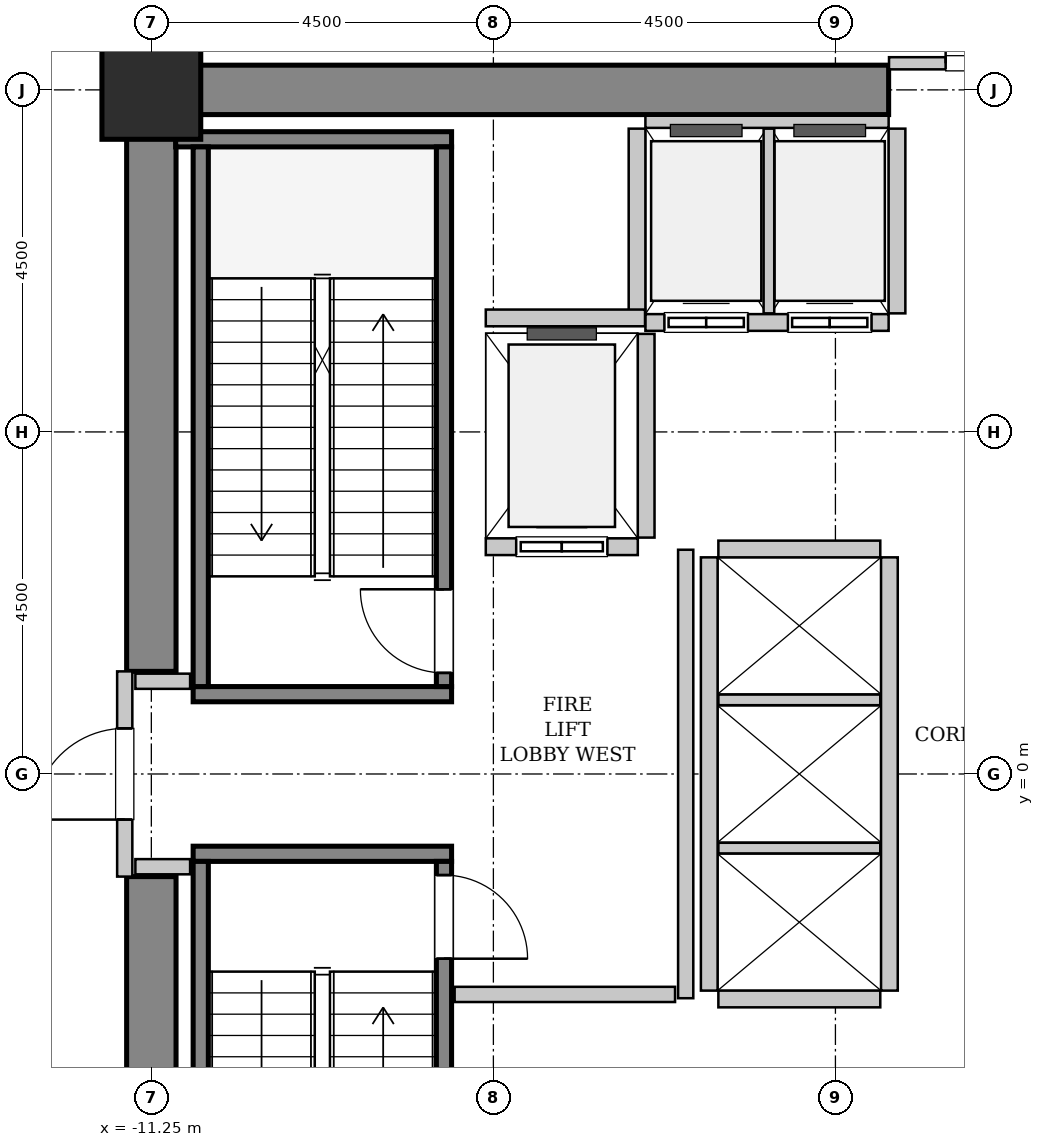
"""IFC4 building model, lengths in metres.
Left out: names, types, materials, properties, quantities, classifications, styles, units other than length and angle.
Written with IfcOpenShell. Run it as: python <this file> out.ifc"""

import sys

from ifc_helpers import new_model, si_unit, direction, frame, frame_2d, origin, origin_2d, place, context, subcontext, project, spatial, rectangle, hollow_rectangle, extrude, source, transform, mapped, element, fill, save


model = new_model("IFC4")
c1 = context("Model", 3, precision=1e-05, world=origin(), true_north=direction((0.0, 1.0)))
c2 = subcontext(c1, "Body", "Model", "MODEL_VIEW")
j1 = project(units=[si_unit("LENGTHUNIT", "METRE"), si_unit("PLANEANGLEUNIT", "RADIAN")], contexts=[c1])
p1 = place(None, origin())
s1 = spatial("IfcSite", under=j1, at=p1, CompositionType="ELEMENT")
p2 = place(p1, origin())
s2 = spatial("IfcBuilding", under=s1, at=p2, CompositionType="ELEMENT")
p3 = place(p2, frame((0.0, 0.0, 11.4)))
s3 = spatial("IfcBuildingStorey", under=s2, at=p3, CompositionType="ELEMENT", Elevation=11.4)
m1 = source(origin(), c2, "Body", "SweptSolid", [
    extrude(rectangle(XDim=10.025, YDim=0.65, at=frame_2d((5.012, 0.0))), origin(), (0.0, 0.0, 1.0), 5.4),
])
p4 = place(p3, frame((-11.575, 9.0, 0.0), z_axis=(0.0, 0.0, 1.0), x_axis=(1.0, 0.0, 0.0)))
e1 = element("IfcWall", 1, at=p4, inside=s3, PredefinedType="SHEAR", context=c2, shape_type="MappedRepresentation", body=[
    mapped(m1, transform((0.0, 0.0, 0.0), x_axis=(1.0, 0.0, 0.0), y_axis=(0.0, 1.0, 0.0), z_axis=(0.0, 0.0, 1.0), scale=1.0)),
])
m2 = source(origin(), c2, "Body", "SweptSolid", [
    extrude(rectangle(XDim=7.325, YDim=0.65, at=frame_2d((3.663, 0.0))), origin(), (0.0, 0.0, 1.0), 5.4),
])
for number, where, z_axis, x_axis in (
    (2, (-11.25, -8.675, 0.0), (0.0, 0.0, 1.0), (0.0, 1.0, 0.0)),
    (3, (-11.25, 1.35, 0.0), (0.0, 0.0, 1.0), (0.0, 1.0, 0.0)),
):
    element("IfcWall", number, at=place(p3, frame(where, z_axis=z_axis, x_axis=x_axis)), inside=s3, PredefinedType="SHEAR", context=c2, shape_type="MappedRepresentation", body=[
        mapped(m2, transform((0.0, 0.0, 0.0), x_axis=(1.0, 0.0, 0.0), y_axis=(0.0, 1.0, 0.0), z_axis=(0.0, 0.0, 1.0), scale=1.0)),
    ])
m3 = source(origin(), c2, "Body", "SweptSolid", [
    extrude(hollow_rectangle(XDim=1.3, YDim=1.3, WallThickness=0.065, InnerFilletRadius=0.065, OuterFilletRadius=0.13, at=origin_2d()), origin(), (0.0, 0.0, 1.0), 5.4),
])
p5 = place(p3, frame((-11.25, 9.0, 0.0), z_axis=(0.0, 0.0, 1.0), x_axis=(1.0, 0.0, 0.0)))
e4 = element("IfcColumn", 4, at=p5, inside=s3, PredefinedType="COLUMN", context=c2, shape_type="MappedRepresentation", body=[
    mapped(m3, transform((0.0, 0.0, 0.0), x_axis=(1.0, 0.0, 0.0), y_axis=(0.0, 1.0, 0.0), z_axis=(0.0, 0.0, 1.0), scale=1.0)),
])
m4 = source(origin(), c2, "Body", "SweptSolid", [
    extrude(rectangle(XDim=3.4, YDim=0.2, at=frame_2d((1.7, 0.0))), origin(), (0.0, 0.0, 1.0), 5.4),
])
p6 = place(p3, frame((-7.3, 1.05, 0.0), z_axis=(0.0, 0.0, 1.0), x_axis=(-1.0, 0.0, 0.0)))
e5 = element("IfcWall", 5, at=p6, inside=s3, PredefinedType="SOLIDWALL", context=c2, shape_type="MappedRepresentation", body=[
    mapped(m4, transform((0.0, 0.0, 0.0), x_axis=(1.0, 0.0, 0.0), y_axis=(0.0, 1.0, 0.0), z_axis=(0.0, 0.0, 1.0), scale=1.0)),
])
m5 = source(origin(), c2, "Body", "SweptSolid", [
    extrude(rectangle(XDim=3.63, YDim=0.2, at=frame_2d((1.815, 0.0))), origin(), (0.0, 0.0, 1.0), 5.4),
])
p7 = place(p3, frame((-7.3, 8.35, 0.0), z_axis=(0.0, 0.0, 1.0), x_axis=(-1.0, 0.0, 0.0)))
e6 = element("IfcWall", 6, at=p7, inside=s3, PredefinedType="SOLIDWALL", context=c2, shape_type="MappedRepresentation", body=[
    mapped(m5, transform((0.0, 0.0, 0.0), x_axis=(1.0, 0.0, 0.0), y_axis=(0.0, 1.0, 0.0), z_axis=(0.0, 0.0, 1.0), scale=1.0)),
])
m6 = source(origin(), c2, "Body", "SweptSolid", [
    extrude(rectangle(XDim=7.1, YDim=0.2, at=frame_2d((3.55, 0.0))), origin(), (0.0, 0.0, 1.0), 5.4),
])
p8 = place(p3, frame((-7.4, 1.15, 0.0), z_axis=(0.0, 0.0, 1.0), x_axis=(0.0, 1.0, 0.0)))
e7 = element("IfcWall", 7, at=p8, inside=s3, PredefinedType="SOLIDWALL", context=c2, shape_type="MappedRepresentation", body=[
    mapped(m6, transform((0.0, 0.0, 0.0), x_axis=(1.0, 0.0, 0.0), y_axis=(0.0, 1.0, 0.0), z_axis=(0.0, 0.0, 1.0), scale=1.0)),
])
p9 = place(p8, frame((0.18, 0.0, 0.0)))
e8 = element("IfcOpeningElement", 8, at=p9, cuts=e7, PredefinedType="OPENING", context=c2, shape_type="SweptSolid", body=[
    extrude(rectangle(XDim=1.1, YDim=2.15, at=frame_2d((0.55, 1.075))), frame((0.0, 0.11, 0.0), z_axis=(0.0, -1.0, 0.0), x_axis=(1.0, 0.0, 0.0)), (0.0, 0.0, 1.0), 0.22),
])
p10 = place(p3, frame((-10.6, 1.15, 0.0), z_axis=(0.0, 0.0, 1.0), x_axis=(0.0, 1.0, 0.0)))
e9 = element("IfcWall", 9, at=p10, inside=s3, PredefinedType="SOLIDWALL", context=c2, shape_type="MappedRepresentation", body=[
    mapped(m6, transform((0.0, 0.0, 0.0), x_axis=(1.0, 0.0, 0.0), y_axis=(0.0, 1.0, 0.0), z_axis=(0.0, 0.0, 1.0), scale=1.0)),
])
p11 = place(p3, frame((-10.7, -1.05, 0.0), z_axis=(0.0, 0.0, 1.0), x_axis=(1.0, 0.0, 0.0)))
e10 = element("IfcWall", 10, at=p11, inside=s3, PredefinedType="SOLIDWALL", context=c2, shape_type="MappedRepresentation", body=[
    mapped(m4, transform((0.0, 0.0, 0.0), x_axis=(1.0, 0.0, 0.0), y_axis=(0.0, 1.0, 0.0), z_axis=(0.0, 0.0, 1.0), scale=1.0)),
])
p12 = place(p3, frame((-10.6, -1.15, 0.0), z_axis=(0.0, 0.0, 1.0), x_axis=(0.0, -1.0, 0.0)))
e11 = element("IfcWall", 11, at=p12, inside=s3, PredefinedType="SOLIDWALL", context=c2, shape_type="MappedRepresentation", body=[
    mapped(m6, transform((0.0, 0.0, 0.0), x_axis=(1.0, 0.0, 0.0), y_axis=(0.0, 1.0, 0.0), z_axis=(0.0, 0.0, 1.0), scale=1.0)),
])
p13 = place(p3, frame((-7.4, -1.15, 0.0), z_axis=(0.0, 0.0, 1.0), x_axis=(0.0, -1.0, 0.0)))
e12 = element("IfcWall", 12, at=p13, inside=s3, PredefinedType="SOLIDWALL", context=c2, shape_type="MappedRepresentation", body=[
    mapped(m6, transform((0.0, 0.0, 0.0), x_axis=(1.0, 0.0, 0.0), y_axis=(0.0, 1.0, 0.0), z_axis=(0.0, 0.0, 1.0), scale=1.0)),
])
p14 = place(p13, frame((0.18, 0.0, 0.0)))
e13 = element("IfcOpeningElement", 13, at=p14, cuts=e12, PredefinedType="OPENING", context=c2, shape_type="SweptSolid", body=[
    extrude(rectangle(XDim=1.1, YDim=2.15, at=frame_2d((0.55, 1.075))), frame((0.0, 0.11, 0.0), z_axis=(0.0, -1.0, 0.0), x_axis=(1.0, 0.0, 0.0)), (0.0, 0.0, 1.0), 0.22),
])
m7 = source(origin(), c2, "Body", "SweptSolid", [
    extrude(rectangle(XDim=2.0, YDim=0.22, at=frame_2d((1.0, 0.0))), origin(), (0.0, 0.0, 1.0), 5.085),
])
p15 = place(p3, frame((-6.85, 2.99, 0.0), z_axis=(0.0, 0.0, 1.0), x_axis=(1.0, 0.0, 0.0)))
e14 = element("IfcWall", 14, at=p15, inside=s3, PredefinedType="SOLIDWALL", context=c2, shape_type="MappedRepresentation", body=[
    mapped(m7, transform((0.0, 0.0, 0.0), x_axis=(1.0, 0.0, 0.0), y_axis=(0.0, 1.0, 0.0), z_axis=(0.0, 0.0, 1.0), scale=1.0)),
])
p16 = place(p15, frame((0.4, 0.0, 0.0)))
e15 = element("IfcOpeningElement", 15, at=p16, cuts=e14, PredefinedType="OPENING", context=c2, shape_type="SweptSolid", body=[
    extrude(rectangle(XDim=1.2, YDim=2.2, at=frame_2d((0.6, 1.1))), frame((0.0, 0.12, 0.0), z_axis=(0.0, -1.0, 0.0), x_axis=(1.0, 0.0, 0.0)), (0.0, 0.0, 1.0), 0.24),
])
m8 = source(origin(), c2, "Body", "SweptSolid", [
    extrude(rectangle(XDim=2.68, YDim=0.22, at=frame_2d((1.34, 0.0))), origin(), (0.0, 0.0, 1.0), 5.085),
])
p17 = place(p3, frame((-4.74, 3.11, 0.0), z_axis=(0.0, 0.0, 1.0), x_axis=(0.0, 1.0, 0.0)))
e16 = element("IfcWall", 16, at=p17, inside=s3, PredefinedType="SOLIDWALL", context=c2, shape_type="MappedRepresentation", body=[
    mapped(m8, transform((0.0, 0.0, 0.0), x_axis=(1.0, 0.0, 0.0), y_axis=(0.0, 1.0, 0.0), z_axis=(0.0, 0.0, 1.0), scale=1.0)),
])
m9 = source(origin(), c2, "Body", "SweptSolid", [
    extrude(rectangle(XDim=3.2, YDim=0.22, at=frame_2d((1.6, 0.0))), origin(), (0.0, 0.0, 1.0), 5.085),
])
p18 = place(p3, frame((-4.75, 5.94, 0.0), z_axis=(0.0, 0.0, 1.0), x_axis=(1.0, 0.0, 0.0)))
e17 = element("IfcWall", 17, at=p18, inside=s3, PredefinedType="SOLIDWALL", context=c2, shape_type="MappedRepresentation", body=[
    mapped(m9, transform((0.0, 0.0, 0.0), x_axis=(1.0, 0.0, 0.0), y_axis=(0.0, 1.0, 0.0), z_axis=(0.0, 0.0, 1.0), scale=1.0)),
])
p19 = place(p18, frame((0.25, 0.0, 0.0)))
e18 = element("IfcOpeningElement", 18, at=p19, cuts=e17, PredefinedType="OPENING", context=c2, shape_type="SweptSolid", body=[
    extrude(rectangle(XDim=1.1, YDim=2.2, at=frame_2d((0.55, 1.1))), frame((0.0, 0.12, 0.0), z_axis=(0.0, -1.0, 0.0), x_axis=(1.0, 0.0, 0.0)), (0.0, 0.0, 1.0), 0.24),
])
p20 = place(p18, frame((1.875, 0.0, 0.0)))
e19 = element("IfcOpeningElement", 19, at=p20, cuts=e17, PredefinedType="OPENING", context=c2, shape_type="SweptSolid", body=[
    extrude(rectangle(XDim=1.1, YDim=2.2, at=frame_2d((0.55, 1.1))), frame((0.0, 0.12, 0.0), z_axis=(0.0, -1.0, 0.0), x_axis=(1.0, 0.0, 0.0)), (0.0, 0.0, 1.0), 0.24),
])
m10 = source(origin(), c2, "Body", "SweptSolid", [
    extrude(rectangle(XDim=3.2, YDim=0.16, at=frame_2d((1.6, 0.0))), origin(), (0.0, 0.0, 1.0), 3.975),
])
p21 = place(p3, frame((-1.55, 8.58, 0.0), z_axis=(0.0, 0.0, 1.0), x_axis=(-1.0, 0.0, 0.0)))
e20 = element("IfcWall", 20, at=p21, inside=s3, PredefinedType="PARTITIONING", context=c2, shape_type="MappedRepresentation", body=[
    mapped(m10, transform((0.0, 0.0, 0.0), x_axis=(1.0, 0.0, 0.0), y_axis=(0.0, 1.0, 0.0), z_axis=(0.0, 0.0, 1.0), scale=1.0)),
])
m11 = source(origin(), c2, "Body", "SweptSolid", [
    extrude(rectangle(XDim=2.43, YDim=0.22, at=frame_2d((1.215, 0.0))), origin(), (0.0, 0.0, 1.0), 5.085),
])
p22 = place(p3, frame((-4.86, 8.49, 0.0), z_axis=(0.0, 0.0, 1.0), x_axis=(0.0, -1.0, 0.0)))
e21 = element("IfcWall", 21, at=p22, inside=s3, PredefinedType="SOLIDWALL", context=c2, shape_type="MappedRepresentation", body=[
    mapped(m11, transform((0.0, 0.0, 0.0), x_axis=(1.0, 0.0, 0.0), y_axis=(0.0, 1.0, 0.0), z_axis=(0.0, 0.0, 1.0), scale=1.0)),
])
m12 = source(origin(), c2, "Body", "SweptSolid", [
    extrude(rectangle(XDim=2.43, YDim=0.14, at=frame_2d((1.215, 0.0))), origin(), (0.0, 0.0, 1.0), 5.085),
])
p23 = place(p3, frame((-3.125, 6.06, 0.0), z_axis=(0.0, 0.0, 1.0), x_axis=(0.0, 1.0, 0.0)))
e22 = element("IfcWall", 22, at=p23, inside=s3, PredefinedType="PARTITIONING", context=c2, shape_type="MappedRepresentation", body=[
    mapped(m12, transform((0.0, 0.0, 0.0), x_axis=(1.0, 0.0, 0.0), y_axis=(0.0, 1.0, 0.0), z_axis=(0.0, 0.0, 1.0), scale=1.0)),
])
p24 = place(p3, frame((-1.44, 6.06, 0.0), z_axis=(0.0, 0.0, 1.0), x_axis=(0.0, 1.0, 0.0)))
e23 = element("IfcWall", 23, at=p24, inside=s3, PredefinedType="SOLIDWALL", context=c2, shape_type="MappedRepresentation", body=[
    mapped(m11, transform((0.0, 0.0, 0.0), x_axis=(1.0, 0.0, 0.0), y_axis=(0.0, 1.0, 0.0), z_axis=(0.0, 0.0, 1.0), scale=1.0)),
])
m13 = source(origin(), c2, "Body", "SweptSolid", [
    extrude(rectangle(XDim=5.7, YDim=0.22, at=frame_2d((2.85, 0.0))), origin(), (0.0, 0.0, 1.0), 5.085),
])
for number, where, z_axis, x_axis in (
    (24, (-1.54, -2.85, 0.0), (0.0, 0.0, 1.0), (0.0, 1.0, 0.0)),
    (25, (-3.91, 2.85, 0.0), (0.0, 0.0, 1.0), (0.0, -1.0, 0.0)),
):
    element("IfcWall", number, at=place(p3, frame(where, z_axis=z_axis, x_axis=x_axis)), inside=s3, PredefinedType="SOLIDWALL", context=c2, shape_type="MappedRepresentation", body=[
        mapped(m13, transform((0.0, 0.0, 0.0), x_axis=(1.0, 0.0, 0.0), y_axis=(0.0, 1.0, 0.0), z_axis=(0.0, 0.0, 1.0), scale=1.0)),
    ])
m14 = source(origin(), c2, "Body", "SweptSolid", [
    extrude(rectangle(XDim=2.13, YDim=0.22, at=frame_2d((1.065, 0.0))), origin(), (0.0, 0.0, 1.0), 5.085),
])
p25 = place(p3, frame((-3.79, -2.96, 0.0), z_axis=(0.0, 0.0, 1.0), x_axis=(1.0, 0.0, 0.0)))
e26 = element("IfcWall", 26, at=p25, inside=s3, PredefinedType="SOLIDWALL", context=c2, shape_type="MappedRepresentation", body=[
    mapped(m14, transform((0.0, 0.0, 0.0), x_axis=(1.0, 0.0, 0.0), y_axis=(0.0, 1.0, 0.0), z_axis=(0.0, 0.0, 1.0), scale=1.0)),
])
m15 = source(origin(), c2, "Body", "SweptSolid", [
    extrude(rectangle(XDim=2.13, YDim=0.14, at=frame_2d((1.065, 0.0))), origin(), (0.0, 0.0, 1.0), 5.085),
])
for number, where, z_axis, x_axis in (
    (27, (-3.79, -0.975, 0.0), (0.0, 0.0, 1.0), (1.0, 0.0, 0.0)),
    (28, (-3.79, 0.975, 0.0), (0.0, 0.0, 1.0), (1.0, 0.0, 0.0)),
):
    element("IfcWall", number, at=place(p3, frame(where, z_axis=z_axis, x_axis=x_axis)), inside=s3, PredefinedType="PARTITIONING", context=c2, shape_type="MappedRepresentation", body=[
        mapped(m15, transform((0.0, 0.0, 0.0), x_axis=(1.0, 0.0, 0.0), y_axis=(0.0, 1.0, 0.0), z_axis=(0.0, 0.0, 1.0), scale=1.0)),
    ])
p26 = place(p3, frame((-1.66, 2.96, 0.0), z_axis=(0.0, 0.0, 1.0), x_axis=(-1.0, 0.0, 0.0)))
e29 = element("IfcWall", 29, at=p26, inside=s3, PredefinedType="SOLIDWALL", context=c2, shape_type="MappedRepresentation", body=[
    mapped(m14, transform((0.0, 0.0, 0.0), x_axis=(1.0, 0.0, 0.0), y_axis=(0.0, 1.0, 0.0), z_axis=(0.0, 0.0, 1.0), scale=1.0)),
])
m16 = source(origin(), c2, "Body", "SweptSolid", [
    extrude(rectangle(XDim=2.095, YDim=0.22, at=frame_2d((1.048, 0.0))), origin(), (0.0, 0.0, 1.0), 5.085),
])
p27 = place(p3, frame((-6.85, 6.0, 0.0), z_axis=(0.0, 0.0, 1.0), x_axis=(1.0, 0.0, 0.0)))
e30 = element("IfcWall", 30, at=p27, inside=s3, PredefinedType="SOLIDWALL", context=c2, shape_type="MappedRepresentation", body=[
    mapped(m16, transform((0.0, 0.0, 0.0), x_axis=(1.0, 0.0, 0.0), y_axis=(0.0, 1.0, 0.0), z_axis=(0.0, 0.0, 1.0), scale=1.0)),
])
m17 = source(origin(), c2, "Body", "SweptSolid", [
    extrude(rectangle(XDim=2.7, YDim=0.2, at=frame_2d((1.35, 0.0))), origin(), (0.0, 0.0, 1.0), 3.975),
])
p28 = place(p3, frame((-11.6, -1.35, 0.0), z_axis=(0.0, 0.0, 1.0), x_axis=(0.0, 1.0, 0.0)))
e31 = element("IfcWall", 31, at=p28, inside=s3, PredefinedType="PARTITIONING", context=c2, shape_type="MappedRepresentation", body=[
    mapped(m17, transform((0.0, 0.0, 0.0), x_axis=(1.0, 0.0, 0.0), y_axis=(0.0, 1.0, 0.0), z_axis=(0.0, 0.0, 1.0), scale=1.0)),
])
p29 = place(p28, frame((0.75, 0.0, 0.0)))
e32 = element("IfcOpeningElement", 32, at=p29, cuts=e31, PredefinedType="OPENING", context=c2, shape_type="SweptSolid", body=[
    extrude(rectangle(XDim=1.2, YDim=2.15, at=frame_2d((0.6, 1.075))), frame((0.0, 0.11, 0.0), z_axis=(0.0, -1.0, 0.0), x_axis=(1.0, 0.0, 0.0)), (0.0, 0.0, 1.0), 0.22),
])
m18 = source(origin(), c2, "Body", "SweptSolid", [
    extrude(rectangle(XDim=5.9, YDim=0.2, at=frame_2d((2.95, 0.0))), origin(), (0.0, 0.0, 1.0), 5.085),
])
p30 = place(p3, frame((-4.22, -2.95, 0.0), z_axis=(0.0, 0.0, 1.0), x_axis=(0.0, 1.0, 0.0)))
e33 = element("IfcWall", 33, at=p30, inside=s3, PredefinedType="PARTITIONING", context=c2, shape_type="MappedRepresentation", body=[
    mapped(m18, transform((0.0, 0.0, 0.0), x_axis=(1.0, 0.0, 0.0), y_axis=(0.0, 1.0, 0.0), z_axis=(0.0, 0.0, 1.0), scale=1.0)),
])
m19 = source(origin(), c2, "Body", "SweptSolid", [
    extrude(rectangle(XDim=2.9, YDim=0.2, at=frame_2d((1.45, 0.0))), origin(), (0.0, 0.0, 1.0), 5.085),
])
p31 = place(p3, frame((-7.26, -2.9, 0.0), z_axis=(0.0, 0.0, 1.0), x_axis=(1.0, 0.0, 0.0)))
e34 = element("IfcWall", 34, at=p31, inside=s3, PredefinedType="PARTITIONING", context=c2, shape_type="MappedRepresentation", body=[
    mapped(m19, transform((0.0, 0.0, 0.0), x_axis=(1.0, 0.0, 0.0), y_axis=(0.0, 1.0, 0.0), z_axis=(0.0, 0.0, 1.0), scale=1.0)),
])
m20 = source(origin(), c2, "Body", "SweptSolid", [
    extrude(rectangle(XDim=0.72, YDim=0.2, at=frame_2d((0.36, 0.0))), origin(), (0.0, 0.0, 1.0), 5.085),
])
for number, where, z_axis, x_axis in (
    (35, (-11.46, 1.22, 0.0), (0.0, 0.0, 1.0), (1.0, 0.0, 0.0)),
    (36, (-11.46, -1.22, 0.0), (0.0, 0.0, 1.0), (1.0, 0.0, 0.0)),
):
    element("IfcWall", number, at=place(p3, frame(where, z_axis=z_axis, x_axis=x_axis)), inside=s3, PredefinedType="PARTITIONING", context=c2, shape_type="MappedRepresentation", body=[
        mapped(m20, transform((0.0, 0.0, 0.0), x_axis=(1.0, 0.0, 0.0), y_axis=(0.0, 1.0, 0.0), z_axis=(0.0, 0.0, 1.0), scale=1.0)),
    ])
m21 = source(origin(), c2, "Body", "SweptSolid", [
    extrude(rectangle(XDim=3.09, YDim=0.16, at=frame_2d((1.545, 0.0))), origin(), (0.0, 0.0, 1.0), 3.975),
])
p32 = place(p3, frame((-1.545, 9.35, 0.0), z_axis=(0.0, 0.0, 1.0), x_axis=(1.0, 0.0, 0.0)))
e37 = element("IfcWall", 37, at=p32, inside=s3, PredefinedType="PARTITIONING", context=c2, shape_type="MappedRepresentation", body=[
    mapped(m21, transform((0.0, 0.0, 0.0), x_axis=(1.0, 0.0, 0.0), y_axis=(0.0, 1.0, 0.0), z_axis=(0.0, 0.0, 1.0), scale=1.0)),
])
p33 = place(p32, frame((0.745, 0.0, 0.0)))
e38 = element("IfcOpeningElement", 38, at=p33, cuts=e37, PredefinedType="OPENING", context=c2, shape_type="SweptSolid", body=[
    extrude(rectangle(XDim=1.6, YDim=2.3, at=frame_2d((0.8, 1.15))), frame((0.0, 0.09, 0.0), z_axis=(0.0, -1.0, 0.0), x_axis=(1.0, 0.0, 0.0)), (0.0, 0.0, 1.0), 0.18),
])
m22 = source(origin(), c2, "Body", "SweptSolid", [
    extrude(rectangle(XDim=1.1, YDim=2.15, at=frame_2d((0.55, 1.075))), frame((0.0, 0.025, 0.0), z_axis=(0.0, -1.0, 0.0), x_axis=(1.0, 0.0, 0.0)), (0.0, 0.0, 1.0), 0.05),
])
p34 = place(p9, origin())
e39 = element("IfcDoor", 39, at=p34, inside=s3, OperationType="SINGLE_SWING_RIGHT", PredefinedType="DOOR", context=c2, shape_type="MappedRepresentation", body=[
    mapped(m22, transform((0.0, 0.0, 0.0), x_axis=(1.0, 0.0, 0.0), y_axis=(0.0, 1.0, 0.0), z_axis=(0.0, 0.0, 1.0), scale=1.0)),
])
fill(e8, e39)
p35 = place(p14, origin())
e40 = element("IfcDoor", 40, at=p35, inside=s3, OperationType="SINGLE_SWING_RIGHT", PredefinedType="DOOR", context=c2, shape_type="MappedRepresentation", body=[
    mapped(m22, transform((0.0, 0.0, 0.0), x_axis=(1.0, 0.0, 0.0), y_axis=(0.0, 1.0, 0.0), z_axis=(0.0, 0.0, 1.0), scale=1.0)),
])
fill(e13, e40)
m23 = source(origin(), c2, "Body", "SweptSolid", [
    extrude(rectangle(XDim=1.2, YDim=2.2, at=frame_2d((0.6, 1.1))), frame((0.0, 0.025, 0.0), z_axis=(0.0, -1.0, 0.0), x_axis=(1.0, 0.0, 0.0)), (0.0, 0.0, 1.0), 0.05),
])
p36 = place(p16, origin())
e41 = element("IfcDoor", 41, at=p36, inside=s3, OperationType="SLIDING_TO_LEFT", PredefinedType="DOOR", context=c2, shape_type="MappedRepresentation", body=[
    mapped(m23, transform((0.0, 0.0, 0.0), x_axis=(1.0, 0.0, 0.0), y_axis=(0.0, 1.0, 0.0), z_axis=(0.0, 0.0, 1.0), scale=1.0)),
])
fill(e15, e41)
m24 = source(origin(), c2, "Body", "SweptSolid", [
    extrude(rectangle(XDim=1.1, YDim=2.2, at=frame_2d((0.55, 1.1))), frame((0.0, 0.025, 0.0), z_axis=(0.0, -1.0, 0.0), x_axis=(1.0, 0.0, 0.0)), (0.0, 0.0, 1.0), 0.05),
])
p37 = place(p19, origin())
e42 = element("IfcDoor", 42, at=p37, inside=s3, OperationType="DOUBLE_DOOR_SLIDING", PredefinedType="DOOR", context=c2, shape_type="MappedRepresentation", body=[
    mapped(m24, transform((0.0, 0.0, 0.0), x_axis=(1.0, 0.0, 0.0), y_axis=(0.0, 1.0, 0.0), z_axis=(0.0, 0.0, 1.0), scale=1.0)),
])
fill(e18, e42)
p38 = place(p20, origin())
e43 = element("IfcDoor", 43, at=p38, inside=s3, OperationType="DOUBLE_DOOR_SLIDING", PredefinedType="DOOR", context=c2, shape_type="MappedRepresentation", body=[
    mapped(m24, transform((0.0, 0.0, 0.0), x_axis=(1.0, 0.0, 0.0), y_axis=(0.0, 1.0, 0.0), z_axis=(0.0, 0.0, 1.0), scale=1.0)),
])
fill(e19, e43)
m25 = source(origin(), c2, "Body", "SweptSolid", [
    extrude(rectangle(XDim=1.2, YDim=2.15, at=frame_2d((0.6, 1.075))), frame((0.0, 0.025, 0.0), z_axis=(0.0, -1.0, 0.0), x_axis=(1.0, 0.0, 0.0)), (0.0, 0.0, 1.0), 0.05),
])
p39 = place(p29, origin())
e44 = element("IfcDoor", 44, at=p39, inside=s3, OperationType="SINGLE_SWING_LEFT", PredefinedType="DOOR", context=c2, shape_type="MappedRepresentation", body=[
    mapped(m25, transform((0.0, 0.0, 0.0), x_axis=(1.0, 0.0, 0.0), y_axis=(0.0, 1.0, 0.0), z_axis=(0.0, 0.0, 1.0), scale=1.0)),
])
fill(e32, e44)
m26 = source(origin(), c2, "Body", "SweptSolid", [
    extrude(rectangle(XDim=1.6, YDim=2.3, at=frame_2d((0.8, 1.15))), frame((0.0, 0.025, 0.0), z_axis=(0.0, -1.0, 0.0), x_axis=(1.0, 0.0, 0.0)), (0.0, 0.0, 1.0), 0.05),
])
p40 = place(p33, origin())
e45 = element("IfcDoor", 45, at=p40, inside=s3, OperationType="DOUBLE_DOOR_SINGLE_SWING", PredefinedType="DOOR", context=c2, shape_type="MappedRepresentation", body=[
    mapped(m26, transform((0.0, 0.0, 0.0), x_axis=(1.0, 0.0, 0.0), y_axis=(0.0, 1.0, 0.0), z_axis=(0.0, 0.0, 1.0), scale=1.0)),
])
fill(e38, e45)
save(model, sys.argv[1])
